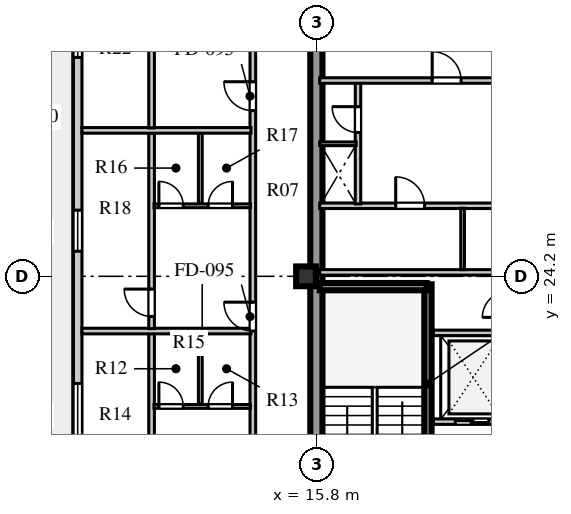
"""IFC4 building model, lengths in metres.
Left out: names, types, materials, properties, quantities, classifications, styles, units other than length and angle.
Written with IfcOpenShell. Run it as: python <this file> out.ifc"""

import sys

from ifc_helpers import new_model, si_unit, direction, frame, frame_2d, origin, origin_2d, place, context, subcontext, project, spatial, rectangle, extrude, element, fill, save


model = new_model("IFC4")
c1 = context("Model", 3, precision=1e-05, world=origin(), true_north=direction((0.0, 1.0)))
c2 = subcontext(c1, "Body", "Model", "MODEL_VIEW")
j1 = project(units=[si_unit("LENGTHUNIT", "METRE"), si_unit("PLANEANGLEUNIT", "RADIAN")], contexts=[c1])
p1 = place(None, origin())
s1 = spatial("IfcSite", under=j1, at=p1, CompositionType="ELEMENT")
p2 = place(p1, origin())
s2 = spatial("IfcBuilding", under=s1, at=p2, CompositionType="ELEMENT")
p3 = place(p2, frame((0.0, 0.0, 260.9)))
s3 = spatial("IfcBuildingStorey", under=s2, at=p3, CompositionType="ELEMENT", Elevation=260.9)
p4 = place(p3, frame((15.79, 15.81, 0.0), z_axis=(0.0, 0.0, 1.0), x_axis=(0.0, 1.0, 0.0)))
e1 = element("IfcWall", 1, at=p4, inside=s3, PredefinedType="SHEAR", context=c2, shape_type="SweptSolid", body=[
    extrude(rectangle(XDim=25.63, YDim=0.4, at=frame_2d((12.815, 0.0))), origin(), (0.0, 0.0, 1.0), 3.66),
])
p5 = place(p3, frame((15.45, 24.2, 0.0), z_axis=(0.0, 0.0, 1.0), x_axis=(1.0, 0.0, 0.0)))
e2 = element("IfcColumn", 2, at=p5, inside=s3, PredefinedType="COLUMN", context=c2, shape_type="SweptSolid", body=[
    extrude(rectangle(XDim=0.65, YDim=0.65, at=origin_2d()), origin(), (0.0, 0.0, 1.0), 3.66),
])
p6 = place(p3, frame((7.94, 44.07, 0.0), z_axis=(0.0, 0.0, 1.0), x_axis=(0.0, -1.0, 0.0)))
e3 = element("IfcWall", 3, at=p6, inside=s3, PredefinedType="STANDARD", context=c2, shape_type="SweptSolid", body=[
    extrude(rectangle(XDim=30.94, YDim=0.28, at=frame_2d((15.47, 0.0))), origin(), (0.0, 0.0, 1.0), 3.66),
])
p7 = place(p6, frame((29.325, 0.0, 0.8)))
e4 = element("IfcOpeningElement", 4, at=p7, cuts=e3, PredefinedType="OPENING", context=c2, shape_type="SweptSolid", body=[
    extrude(rectangle(XDim=0.95, YDim=1.65, at=frame_2d((0.475, 0.825))), frame((0.0, 0.15, 0.0), z_axis=(0.0, -1.0, 0.0), x_axis=(1.0, 0.0, 0.0)), (0.0, 0.0, 1.0), 0.3),
])
p8 = place(p6, frame((27.28, 0.0, 0.0)))
e5 = element("IfcOpeningElement", 5, at=p8, cuts=e3, PredefinedType="OPENING", context=c2, shape_type="SweptSolid", body=[
    extrude(rectangle(XDim=1.0, YDim=2.05, at=frame_2d((0.5, 1.025))), frame((0.0, 0.15, 0.0), z_axis=(0.0, -1.0, 0.0), x_axis=(1.0, 0.0, 0.0)), (0.0, 0.0, 1.0), 0.3),
])
p9 = place(p6, frame((23.395, 0.0, 0.8)))
e6 = element("IfcOpeningElement", 6, at=p9, cuts=e3, PredefinedType="OPENING", context=c2, shape_type="SweptSolid", body=[
    extrude(rectangle(XDim=2.1, YDim=1.95, at=frame_2d((1.05, 0.975))), frame((0.0, 0.15, 0.0), z_axis=(0.0, -1.0, 0.0), x_axis=(1.0, 0.0, 0.0)), (0.0, 0.0, 1.0), 0.3),
])
p10 = place(p6, frame((17.695, 0.0, 0.8)))
e7 = element("IfcOpeningElement", 7, at=p10, cuts=e3, PredefinedType="OPENING", context=c2, shape_type="SweptSolid", body=[
    extrude(rectangle(XDim=1.35, YDim=1.9, at=frame_2d((0.675, 0.95))), frame((0.0, 0.15, 0.0), z_axis=(0.0, -1.0, 0.0), x_axis=(1.0, 0.0, 0.0)), (0.0, 0.0, 1.0), 0.3),
])
p11 = place(p6, frame((11.02, 0.0, 0.8)))
e8 = element("IfcOpeningElement", 8, at=p11, cuts=e3, PredefinedType="OPENING", context=c2, shape_type="SweptSolid", body=[
    extrude(rectangle(XDim=1.65, YDim=1.95, at=frame_2d((0.825, 0.975))), frame((0.0, 0.15, 0.0), z_axis=(0.0, -1.0, 0.0), x_axis=(1.0, 0.0, 0.0)), (0.0, 0.0, 1.0), 0.3),
])
p12 = place(p6, frame((4.42, 0.0, 0.8)))
e9 = element("IfcOpeningElement", 9, at=p12, cuts=e3, PredefinedType="OPENING", context=c2, shape_type="SweptSolid", body=[
    extrude(rectangle(XDim=1.95, YDim=2.0, at=frame_2d((0.975, 1.0))), frame((0.0, 0.15, 0.0), z_axis=(0.0, -1.0, 0.0), x_axis=(1.0, 0.0, 0.0)), (0.0, 0.0, 1.0), 0.3),
])
p13 = place(p6, frame((0.665, 0.0, 0.8)))
e10 = element("IfcOpeningElement", 10, at=p13, cuts=e3, PredefinedType="OPENING", context=c2, shape_type="SweptSolid", body=[
    extrude(rectangle(XDim=0.95, YDim=1.65, at=frame_2d((0.475, 0.825))), frame((0.0, 0.15, 0.0), z_axis=(0.0, -1.0, 0.0), x_axis=(1.0, 0.0, 0.0)), (0.0, 0.0, 1.0), 0.3),
])
p14 = place(p3, frame((19.46, 15.74, 0.0), z_axis=(0.0, 0.0, 1.0), x_axis=(0.0, 1.0, 0.0)))
e11 = element("IfcWall", 11, at=p14, inside=s3, PredefinedType="SHEAR", context=c2, shape_type="SweptSolid", body=[
    extrude(rectangle(XDim=8.2, YDim=0.24, at=frame_2d((4.1, 0.0))), origin(), (0.0, 0.0, 1.0), 3.9),
])
p15 = place(p14, frame((0.45, 0.0, 0.0)))
e12 = element("IfcOpeningElement", 12, at=p15, cuts=e11, PredefinedType="OPENING", context=c2, shape_type="SweptSolid", body=[
    extrude(rectangle(XDim=1.1, YDim=2.1, at=frame_2d((0.55, 1.05))), frame((0.0, 0.13, 0.0), z_axis=(0.0, -1.0, 0.0), x_axis=(1.0, 0.0, 0.0)), (0.0, 0.0, 1.0), 0.26),
])
p16 = place(p3, frame((15.9, 23.86, 0.0), z_axis=(0.0, 0.0, 1.0), x_axis=(1.0, 0.0, 0.0)))
e13 = element("IfcWall", 13, at=p16, inside=s3, PredefinedType="SHEAR", context=c2, shape_type="SweptSolid", body=[
    extrude(rectangle(XDim=3.52, YDim=0.24, at=frame_2d((1.76, 0.0))), origin(), (0.0, 0.0, 1.0), 3.9),
])
p17 = place(p3, frame((19.64, 19.42, 0.0), z_axis=(0.0, 0.0, 1.0), x_axis=(1.0, 0.0, 0.0)))
e14 = element("IfcWall", 14, at=p17, inside=s3, PredefinedType="SOLIDWALL", context=c2, shape_type="SweptSolid", body=[
    extrude(rectangle(XDim=4.94, YDim=0.18, at=frame_2d((2.47, 0.0))), origin(), (0.0, 0.0, 1.0), 3.66),
])
p18 = place(p17, frame((0.72, 0.0, 0.0)))
e15 = element("IfcOpeningElement", 15, at=p18, cuts=e14, PredefinedType="OPENING", context=c2, shape_type="SweptSolid", body=[
    extrude(rectangle(XDim=1.1, YDim=2.1, at=frame_2d((0.55, 1.05))), frame((0.0, 0.1, 0.0), z_axis=(0.0, -1.0, 0.0), x_axis=(1.0, 0.0, 0.0)), (0.0, 0.0, 1.0), 0.2),
])
p19 = place(p17, frame((3.02, 0.0, 0.0)))
e16 = element("IfcOpeningElement", 16, at=p19, cuts=e14, PredefinedType="OPENING", context=c2, shape_type="SweptSolid", body=[
    extrude(rectangle(XDim=1.1, YDim=2.1, at=frame_2d((0.55, 1.05))), frame((0.0, 0.1, 0.0), z_axis=(0.0, -1.0, 0.0), x_axis=(1.0, 0.0, 0.0)), (0.0, 0.0, 1.0), 0.2),
])
p20 = place(p3, frame((19.64, 22.34, 0.0), z_axis=(0.0, 0.0, 1.0), x_axis=(1.0, 0.0, 0.0)))
e17 = element("IfcWall", 17, at=p20, inside=s3, PredefinedType="SOLIDWALL", context=c2, shape_type="SweptSolid", body=[
    extrude(rectangle(XDim=4.94, YDim=0.18, at=frame_2d((2.47, 0.0))), origin(), (0.0, 0.0, 1.0), 3.66),
])
p21 = place(p3, frame((15.9, 26.52, 0.0), z_axis=(0.0, 0.0, 1.0), x_axis=(1.0, 0.0, 0.0)))
e18 = element("IfcWall", 18, at=p21, inside=s3, PredefinedType="SOLIDWALL", context=c2, shape_type="SweptSolid", body=[
    extrude(rectangle(XDim=8.68, YDim=0.18, at=frame_2d((4.34, 0.0))), origin(), (0.0, 0.0, 1.0), 3.66),
])
p22 = place(p21, frame((2.5, 0.0, 0.0)))
e19 = element("IfcOpeningElement", 19, at=p22, cuts=e18, PredefinedType="OPENING", context=c2, shape_type="SweptSolid", body=[
    extrude(rectangle(XDim=0.95, YDim=2.1, at=frame_2d((0.475, 1.05))), frame((0.0, 0.1, 0.0), z_axis=(0.0, -1.0, 0.0), x_axis=(1.0, 0.0, 0.0)), (0.0, 0.0, 1.0), 0.2),
])
p23 = place(p21, frame((6.0, 0.0, 0.0)))
e20 = element("IfcOpeningElement", 20, at=p23, cuts=e18, PredefinedType="OPENING", context=c2, shape_type="SweptSolid", body=[
    extrude(rectangle(XDim=0.95, YDim=2.1, at=frame_2d((0.475, 1.05))), frame((0.0, 0.1, 0.0), z_axis=(0.0, -1.0, 0.0), x_axis=(1.0, 0.0, 0.0)), (0.0, 0.0, 1.0), 0.2),
])
p24 = place(p3, frame((15.9, 24.33, 0.0), z_axis=(0.0, 0.0, 1.0), x_axis=(1.0, 0.0, 0.0)))
e21 = element("IfcWall", 21, at=p24, inside=s3, PredefinedType="SOLIDWALL", context=c2, shape_type="SweptSolid", body=[
    extrude(rectangle(XDim=8.68, YDim=0.18, at=frame_2d((4.34, 0.0))), origin(), (0.0, 0.0, 1.0), 3.06),
])
p25 = place(p3, frame((20.6, 24.42, 0.0), z_axis=(0.0, 0.0, 1.0), x_axis=(0.0, 1.0, 0.0)))
e22 = element("IfcWall", 22, at=p25, inside=s3, PredefinedType="PARTITIONING", context=c2, shape_type="SweptSolid", body=[
    extrude(rectangle(XDim=2.02, YDim=0.12, at=frame_2d((1.01, 0.0))), origin(), (0.0, 0.0, 1.0), 3.66),
])
p26 = place(p3, frame((17.16, 26.58, 0.0), z_axis=(0.0, 0.0, 1.0), x_axis=(0.0, 1.0, 0.0)))
e23 = element("IfcWall", 23, at=p26, inside=s3, PredefinedType="SOLIDWALL", context=c2, shape_type="SweptSolid", body=[
    extrude(rectangle(XDim=4.02, YDim=0.18, at=frame_2d((2.01, 0.0))), origin(), (0.0, 0.0, 1.0), 3.66),
])
p27 = place(p26, frame((2.35, 0.0, 0.0)))
e24 = element("IfcOpeningElement", 24, at=p27, cuts=e23, PredefinedType="OPENING", context=c2, shape_type="SweptSolid", body=[
    extrude(rectangle(XDim=0.85, YDim=2.06, at=frame_2d((0.425, 1.03))), frame((0.0, 0.1, 0.0), z_axis=(0.0, -1.0, 0.0), x_axis=(1.0, 0.0, 0.0)), (0.0, 0.0, 1.0), 0.2),
])
p28 = place(p3, frame((15.9, 28.56, 0.0), z_axis=(0.0, 0.0, 1.0), x_axis=(1.0, 0.0, 0.0)))
e25 = element("IfcWall", 25, at=p28, inside=s3, PredefinedType="PARTITIONING", context=c2, shape_type="SweptSolid", body=[
    extrude(rectangle(XDim=1.2, YDim=0.12, at=frame_2d((0.6, 0.0))), origin(), (0.0, 0.0, 1.0), 3.66),
])
p29 = place(p3, frame((15.9, 30.64, 0.0), z_axis=(0.0, 0.0, 1.0), x_axis=(1.0, 0.0, 0.0)))
e26 = element("IfcWall", 26, at=p29, inside=s3, PredefinedType="SOLIDWALL", context=c2, shape_type="SweptSolid", body=[
    extrude(rectangle(XDim=8.68, YDim=0.18, at=frame_2d((4.34, 0.0))), origin(), (0.0, 0.0, 1.0), 3.66),
])
p30 = place(p29, frame((3.7, 0.0, 0.0)))
e27 = element("IfcOpeningElement", 27, at=p30, cuts=e26, PredefinedType="OPENING", context=c2, shape_type="SweptSolid", body=[
    extrude(rectangle(XDim=0.95, YDim=2.1, at=frame_2d((0.475, 1.05))), frame((0.0, 0.1, 0.0), z_axis=(0.0, -1.0, 0.0), x_axis=(1.0, 0.0, 0.0)), (0.0, 0.0, 1.0), 0.2),
])
p31 = place(p3, frame((13.7, 15.3, 0.0), z_axis=(0.0, 0.0, 1.0), x_axis=(0.0, 1.0, 0.0)))
e28 = element("IfcWall", 28, at=p31, inside=s3, PredefinedType="SOLIDWALL", context=c2, shape_type="SweptSolid", body=[
    extrude(rectangle(XDim=26.6, YDim=0.185, at=frame_2d((13.3, 0.0))), origin(), (0.0, 0.0, 1.0), 3.66),
])
p32 = place(p31, frame((0.65, 0.0, 0.0)))
e29 = element("IfcOpeningElement", 29, at=p32, cuts=e28, PredefinedType="OPENING", context=c2, shape_type="SweptSolid", body=[
    extrude(rectangle(XDim=0.95, YDim=2.1, at=frame_2d((0.475, 1.05))), frame((0.0, 0.103, 0.0), z_axis=(0.0, -1.0, 0.0), x_axis=(1.0, 0.0, 0.0)), (0.0, 0.0, 1.0), 0.205),
])
p33 = place(p31, frame((7.1, 0.0, 0.0)))
e30 = element("IfcOpeningElement", 30, at=p33, cuts=e28, PredefinedType="OPENING", context=c2, shape_type="SweptSolid", body=[
    extrude(rectangle(XDim=0.95, YDim=2.1, at=frame_2d((0.475, 1.05))), frame((0.0, 0.103, 0.0), z_axis=(0.0, -1.0, 0.0), x_axis=(1.0, 0.0, 0.0)), (0.0, 0.0, 1.0), 0.205),
])
p34 = place(p31, frame((14.35, 0.0, 0.0)))
e31 = element("IfcOpeningElement", 31, at=p34, cuts=e28, PredefinedType="OPENING", context=c2, shape_type="SweptSolid", body=[
    extrude(rectangle(XDim=0.95, YDim=2.1, at=frame_2d((0.475, 1.05))), frame((0.0, 0.103, 0.0), z_axis=(0.0, -1.0, 0.0), x_axis=(1.0, 0.0, 0.0)), (0.0, 0.0, 1.0), 0.205),
])
p35 = place(p3, frame((10.37, 15.38, 0.0), z_axis=(0.0, 0.0, 1.0), x_axis=(0.0, 1.0, 0.0)))
e32 = element("IfcWall", 32, at=p35, inside=s3, PredefinedType="SOLIDWALL", context=c2, shape_type="SweptSolid", body=[
    extrude(rectangle(XDim=6.94, YDim=0.185, at=frame_2d((3.47, 0.0))), origin(), (0.0, 0.0, 1.0), 3.66),
])
p36 = place(p35, frame((0.4, 0.0, 0.0)))
e33 = element("IfcOpeningElement", 33, at=p36, cuts=e32, PredefinedType="OPENING", context=c2, shape_type="SweptSolid", body=[
    extrude(rectangle(XDim=0.9, YDim=2.08, at=frame_2d((0.45, 1.04))), frame((0.0, 0.103, 0.0), z_axis=(0.0, -1.0, 0.0), x_axis=(1.0, 0.0, 0.0)), (0.0, 0.0, 1.0), 0.205),
])
p37 = place(p3, frame((10.45, 19.92, 0.0), z_axis=(0.0, 0.0, 1.0), x_axis=(1.0, 0.0, 0.0)))
e34 = element("IfcWall", 34, at=p37, inside=s3, PredefinedType="PLUMBINGWALL", context=c2, shape_type="SweptSolid", body=[
    extrude(rectangle(XDim=3.17, YDim=0.125, at=frame_2d((1.585, 0.0))), origin(), (0.0, 0.0, 1.0), 3.66),
])
p38 = place(p37, frame((0.16, 0.0, 0.0)))
e35 = element("IfcOpeningElement", 35, at=p38, cuts=e34, PredefinedType="OPENING", context=c2, shape_type="SweptSolid", body=[
    extrude(rectangle(XDim=0.8, YDim=2.05, at=frame_2d((0.4, 1.025))), frame((0.0, 0.073, 0.0), z_axis=(0.0, -1.0, 0.0), x_axis=(1.0, 0.0, 0.0)), (0.0, 0.0, 1.0), 0.145),
])
p39 = place(p37, frame((1.782, 0.0, 0.0)))
e36 = element("IfcOpeningElement", 36, at=p39, cuts=e34, PredefinedType="OPENING", context=c2, shape_type="SweptSolid", body=[
    extrude(rectangle(XDim=0.8, YDim=2.05, at=frame_2d((0.4, 1.025))), frame((0.0, 0.073, 0.0), z_axis=(0.0, -1.0, 0.0), x_axis=(1.0, 0.0, 0.0)), (0.0, 0.0, 1.0), 0.145),
])
p40 = place(p3, frame((11.972, 20.0, 0.0), z_axis=(0.0, 0.0, 1.0), x_axis=(0.0, 1.0, 0.0)))
e37 = element("IfcWall", 37, at=p40, inside=s3, PredefinedType="PLUMBINGWALL", context=c2, shape_type="SweptSolid", body=[
    extrude(rectangle(XDim=2.32, YDim=0.125, at=frame_2d((1.16, 0.0))), origin(), (0.0, 0.0, 1.0), 3.66),
])
p41 = place(p3, frame((8.08, 22.4, 0.0), z_axis=(0.0, 0.0, 1.0), x_axis=(1.0, 0.0, 0.0)))
e38 = element("IfcWall", 38, at=p41, inside=s3, PredefinedType="SOLIDWALL", context=c2, shape_type="SweptSolid", body=[
    extrude(rectangle(XDim=5.56, YDim=0.185, at=frame_2d((2.78, 0.0))), origin(), (0.0, 0.0, 1.0), 3.66),
])
p42 = place(p3, frame((10.37, 22.48, 0.0), z_axis=(0.0, 0.0, 1.0), x_axis=(0.0, 1.0, 0.0)))
e39 = element("IfcWall", 39, at=p42, inside=s3, PredefinedType="SOLIDWALL", context=c2, shape_type="SweptSolid", body=[
    extrude(rectangle(XDim=6.44, YDim=0.185, at=frame_2d((3.22, 0.0))), origin(), (0.0, 0.0, 1.0), 3.66),
])
p43 = place(p42, frame((0.4, 0.0, 0.0)))
e40 = element("IfcOpeningElement", 40, at=p43, cuts=e39, PredefinedType="OPENING", context=c2, shape_type="SweptSolid", body=[
    extrude(rectangle(XDim=0.9, YDim=2.08, at=frame_2d((0.45, 1.04))), frame((0.0, 0.103, 0.0), z_axis=(0.0, -1.0, 0.0), x_axis=(1.0, 0.0, 0.0)), (0.0, 0.0, 1.0), 0.205),
])
p44 = place(p3, frame((10.45, 26.52, 0.0), z_axis=(0.0, 0.0, 1.0), x_axis=(1.0, 0.0, 0.0)))
e41 = element("IfcWall", 41, at=p44, inside=s3, PredefinedType="PLUMBINGWALL", context=c2, shape_type="SweptSolid", body=[
    extrude(rectangle(XDim=3.17, YDim=0.125, at=frame_2d((1.585, 0.0))), origin(), (0.0, 0.0, 1.0), 3.66),
])
p45 = place(p44, frame((0.16, 0.0, 0.0)))
e42 = element("IfcOpeningElement", 42, at=p45, cuts=e41, PredefinedType="OPENING", context=c2, shape_type="SweptSolid", body=[
    extrude(rectangle(XDim=0.8, YDim=2.05, at=frame_2d((0.4, 1.025))), frame((0.0, 0.073, 0.0), z_axis=(0.0, -1.0, 0.0), x_axis=(1.0, 0.0, 0.0)), (0.0, 0.0, 1.0), 0.145),
])
p46 = place(p44, frame((1.782, 0.0, 0.0)))
e43 = element("IfcOpeningElement", 43, at=p46, cuts=e41, PredefinedType="OPENING", context=c2, shape_type="SweptSolid", body=[
    extrude(rectangle(XDim=0.8, YDim=2.05, at=frame_2d((0.4, 1.025))), frame((0.0, 0.073, 0.0), z_axis=(0.0, -1.0, 0.0), x_axis=(1.0, 0.0, 0.0)), (0.0, 0.0, 1.0), 0.145),
])
p47 = place(p3, frame((11.972, 26.6, 0.0), z_axis=(0.0, 0.0, 1.0), x_axis=(0.0, 1.0, 0.0)))
e44 = element("IfcWall", 44, at=p47, inside=s3, PredefinedType="PLUMBINGWALL", context=c2, shape_type="SweptSolid", body=[
    extrude(rectangle(XDim=2.32, YDim=0.125, at=frame_2d((1.16, 0.0))), origin(), (0.0, 0.0, 1.0), 3.66),
])
p48 = place(p3, frame((8.08, 29.0, 0.0), z_axis=(0.0, 0.0, 1.0), x_axis=(1.0, 0.0, 0.0)))
e45 = element("IfcWall", 45, at=p48, inside=s3, PredefinedType="SOLIDWALL", context=c2, shape_type="SweptSolid", body=[
    extrude(rectangle(XDim=5.56, YDim=0.185, at=frame_2d((2.78, 0.0))), origin(), (0.0, 0.0, 1.0), 3.66),
])
p49 = place(p3, frame((10.37, 29.08, 0.0), z_axis=(0.0, 0.0, 1.0), x_axis=(0.0, 1.0, 0.0)))
e46 = element("IfcWall", 46, at=p49, inside=s3, PredefinedType="SOLIDWALL", context=c2, shape_type="SweptSolid", body=[
    extrude(rectangle(XDim=12.74, YDim=0.185, at=frame_2d((6.37, 0.0))), origin(), (0.0, 0.0, 1.0), 3.66),
])
p50 = place(p49, frame((5.32, 0.0, 0.0)))
e47 = element("IfcOpeningElement", 47, at=p50, cuts=e46, PredefinedType="OPENING", context=c2, shape_type="SweptSolid", body=[
    extrude(rectangle(XDim=0.85, YDim=2.08, at=frame_2d((0.425, 1.04))), frame((0.0, 0.103, 0.0), z_axis=(0.0, -1.0, 0.0), x_axis=(1.0, 0.0, 0.0)), (0.0, 0.0, 1.0), 0.205),
])
p51 = place(p49, frame((6.62, 0.0, 0.0)))
e48 = element("IfcOpeningElement", 48, at=p51, cuts=e46, PredefinedType="OPENING", context=c2, shape_type="SweptSolid", body=[
    extrude(rectangle(XDim=0.85, YDim=2.08, at=frame_2d((0.425, 1.04))), frame((0.0, 0.103, 0.0), z_axis=(0.0, -1.0, 0.0), x_axis=(1.0, 0.0, 0.0)), (0.0, 0.0, 1.0), 0.205),
])
p52 = place(p9, origin())
e49 = element("IfcWindow", 49, at=p52, inside=s3, PartitioningType="SINGLE_PANEL", PredefinedType="WINDOW", context=c2, shape_type="SweptSolid", body=[
    extrude(rectangle(XDim=2.1, YDim=1.95, at=frame_2d((1.05, 0.975))), frame((0.0, 0.03, 0.0), z_axis=(0.0, -1.0, 0.0), x_axis=(1.0, 0.0, 0.0)), (0.0, 0.0, 1.0), 0.06),
])
fill(e6, e49)
p53 = place(p10, origin())
e50 = element("IfcWindow", 50, at=p53, inside=s3, PartitioningType="SINGLE_PANEL", PredefinedType="WINDOW", context=c2, shape_type="SweptSolid", body=[
    extrude(rectangle(XDim=1.35, YDim=1.9, at=frame_2d((0.675, 0.95))), frame((0.0, 0.03, 0.0), z_axis=(0.0, -1.0, 0.0), x_axis=(1.0, 0.0, 0.0)), (0.0, 0.0, 1.0), 0.06),
])
fill(e7, e50)
p54 = place(p11, origin())
e51 = element("IfcWindow", 51, at=p54, inside=s3, PartitioningType="SINGLE_PANEL", PredefinedType="WINDOW", context=c2, shape_type="SweptSolid", body=[
    extrude(rectangle(XDim=1.65, YDim=1.95, at=frame_2d((0.825, 0.975))), frame((0.0, 0.03, 0.0), z_axis=(0.0, -1.0, 0.0), x_axis=(1.0, 0.0, 0.0)), (0.0, 0.0, 1.0), 0.06),
])
fill(e8, e51)
p55 = place(p18, origin())
e52 = element("IfcDoor", 52, at=p55, inside=s3, OperationType="DOUBLE_DOOR_SLIDING", PredefinedType="DOOR", context=c2, shape_type="SweptSolid", body=[
    extrude(rectangle(XDim=1.1, YDim=2.1, at=frame_2d((0.55, 1.05))), frame((0.0, 0.025, 0.0), z_axis=(0.0, -1.0, 0.0), x_axis=(1.0, 0.0, 0.0)), (0.0, 0.0, 1.0), 0.05),
])
fill(e15, e52)
p56 = place(p22, origin())
e53 = element("IfcDoor", 53, at=p56, inside=s3, OperationType="SINGLE_SWING_LEFT", PredefinedType="DOOR", context=c2, shape_type="SweptSolid", body=[
    extrude(rectangle(XDim=0.95, YDim=2.1, at=frame_2d((0.475, 1.05))), frame((0.0, 0.025, 0.0), z_axis=(0.0, -1.0, 0.0), x_axis=(1.0, 0.0, 0.0)), (0.0, 0.0, 1.0), 0.05),
])
fill(e19, e53)
p57 = place(p27, origin())
e54 = element("IfcDoor", 54, at=p57, inside=s3, OperationType="SINGLE_SWING_RIGHT", PredefinedType="DOOR", context=c2, shape_type="SweptSolid", body=[
    extrude(rectangle(XDim=0.85, YDim=2.06, at=frame_2d((0.425, 1.03))), frame((0.0, 0.025, 0.0), z_axis=(0.0, -1.0, 0.0), x_axis=(1.0, 0.0, 0.0)), (0.0, 0.0, 1.0), 0.05),
])
fill(e24, e54)
p58 = place(p30, frame((0.95, 0.0, 0.0), z_axis=(0.0, 0.0, 1.0), x_axis=(-1.0, 0.0, 0.0)))
e55 = element("IfcDoor", 55, at=p58, inside=s3, OperationType="SINGLE_SWING_RIGHT", PredefinedType="DOOR", context=c2, shape_type="SweptSolid", body=[
    extrude(rectangle(XDim=0.95, YDim=2.1, at=frame_2d((0.475, 1.05))), frame((0.0, 0.025, 0.0), z_axis=(0.0, -1.0, 0.0), x_axis=(1.0, 0.0, 0.0)), (0.0, 0.0, 1.0), 0.05),
])
fill(e27, e55)
p59 = place(p38, origin())
e56 = element("IfcDoor", 56, at=p59, inside=s3, OperationType="SINGLE_SWING_LEFT", PredefinedType="DOOR", context=c2, shape_type="SweptSolid", body=[
    extrude(rectangle(XDim=0.8, YDim=2.05, at=frame_2d((0.4, 1.025))), frame((0.0, 0.025, 0.0), z_axis=(0.0, -1.0, 0.0), x_axis=(1.0, 0.0, 0.0)), (0.0, 0.0, 1.0), 0.05),
])
fill(e35, e56)
p60 = place(p39, origin())
e57 = element("IfcDoor", 57, at=p60, inside=s3, OperationType="SINGLE_SWING_RIGHT", PredefinedType="DOOR", context=c2, shape_type="SweptSolid", body=[
    extrude(rectangle(XDim=0.8, YDim=2.05, at=frame_2d((0.4, 1.025))), frame((0.0, 0.025, 0.0), z_axis=(0.0, -1.0, 0.0), x_axis=(1.0, 0.0, 0.0)), (0.0, 0.0, 1.0), 0.05),
])
fill(e36, e57)
p61 = place(p45, origin())
e58 = element("IfcDoor", 58, at=p61, inside=s3, OperationType="SINGLE_SWING_LEFT", PredefinedType="DOOR", context=c2, shape_type="SweptSolid", body=[
    extrude(rectangle(XDim=0.8, YDim=2.05, at=frame_2d((0.4, 1.025))), frame((0.0, 0.025, 0.0), z_axis=(0.0, -1.0, 0.0), x_axis=(1.0, 0.0, 0.0)), (0.0, 0.0, 1.0), 0.05),
])
fill(e42, e58)
p62 = place(p46, origin())
e59 = element("IfcDoor", 59, at=p62, inside=s3, OperationType="SINGLE_SWING_RIGHT", PredefinedType="DOOR", context=c2, shape_type="SweptSolid", body=[
    extrude(rectangle(XDim=0.8, YDim=2.05, at=frame_2d((0.4, 1.025))), frame((0.0, 0.025, 0.0), z_axis=(0.0, -1.0, 0.0), x_axis=(1.0, 0.0, 0.0)), (0.0, 0.0, 1.0), 0.05),
])
fill(e43, e59)
p63 = place(p43, frame((0.9, 0.0, 0.0), z_axis=(0.0, 0.0, 1.0), x_axis=(-1.0, 0.0, 0.0)))
e60 = element("IfcDoor", 60, at=p63, inside=s3, OperationType="SINGLE_SWING_LEFT", PredefinedType="DOOR", context=c2, shape_type="SweptSolid", body=[
    extrude(rectangle(XDim=0.9, YDim=2.08, at=frame_2d((0.45, 1.04))), frame((0.0, 0.025, 0.0), z_axis=(0.0, -1.0, 0.0), x_axis=(1.0, 0.0, 0.0)), (0.0, 0.0, 1.0), 0.05),
])
fill(e40, e60)
p64 = place(p33, frame((0.95, 0.0, 0.0), z_axis=(0.0, 0.0, 1.0), x_axis=(-1.0, 0.0, 0.0)))
e61 = element("IfcDoor", 61, at=p64, inside=s3, OperationType="SINGLE_SWING_LEFT", PredefinedType="DOOR", context=c2, shape_type="SweptSolid", body=[
    extrude(rectangle(XDim=0.95, YDim=2.1, at=frame_2d((0.475, 1.05))), frame((0.0, 0.025, 0.0), z_axis=(0.0, -1.0, 0.0), x_axis=(1.0, 0.0, 0.0)), (0.0, 0.0, 1.0), 0.05),
])
fill(e30, e61)
p65 = place(p34, frame((0.95, 0.0, 0.0), z_axis=(0.0, 0.0, 1.0), x_axis=(-1.0, 0.0, 0.0)))
e62 = element("IfcDoor", 62, at=p65, inside=s3, OperationType="SINGLE_SWING_LEFT", PredefinedType="DOOR", context=c2, shape_type="SweptSolid", body=[
    extrude(rectangle(XDim=0.95, YDim=2.1, at=frame_2d((0.475, 1.05))), frame((0.0, 0.025, 0.0), z_axis=(0.0, -1.0, 0.0), x_axis=(1.0, 0.0, 0.0)), (0.0, 0.0, 1.0), 0.05),
])
fill(e31, e62)
save(model, sys.argv[1])
